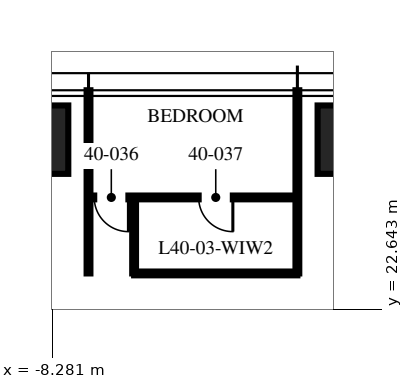
"""IFC4 building model, lengths in metres.
Left out: names, types, materials, properties, quantities, classifications, styles, units other than length and angle.
Written with IfcOpenShell. Run it as: python <this file> out.ifc"""

import sys

from ifc_helpers import new_model, si_unit, direction, frame, frame_2d, origin, origin_2d, place, context, subcontext, project, spatial, rectangle, extrude, element, fill, save


model = new_model("IFC4")
c1 = context("Model", 3, precision=1e-05, world=origin(), true_north=direction((0.0, 1.0)))
c2 = subcontext(c1, "Body", "Model", "MODEL_VIEW")
j1 = project(units=[si_unit("LENGTHUNIT", "METRE"), si_unit("PLANEANGLEUNIT", "RADIAN")], contexts=[c1])
p1 = place(None, origin())
s1 = spatial("IfcSite", under=j1, at=p1, CompositionType="ELEMENT")
p2 = place(p1, origin())
s2 = spatial("IfcBuilding", under=s1, at=p2, CompositionType="ELEMENT")
p3 = place(p2, frame((0.0, 0.0, 159.75)))
s3 = spatial("IfcBuildingStorey", under=s2, at=p3, CompositionType="ELEMENT", Elevation=159.75)
for number, where, z_axis, x_axis in (
    (1, (-9.16, 27.1, 0.0), (0.0, 0.0, 1.0), (1.0, 0.0, 0.0)),
    (2, (0.0, 27.1, 0.0), (0.0, 0.0, 1.0), (1.0, 0.0, 0.0)),
):
    element("IfcColumn", number, at=place(p3, frame(where, z_axis=z_axis, x_axis=x_axis)), inside=s3, PredefinedType="COLUMN", context=c2, shape_type="SweptSolid", body=[
        extrude(rectangle(XDim=2.6, YDim=1.8, at=origin_2d()), origin(), (0.0, 0.0, 1.0), 3.75),
    ])
for number, where, z_axis, x_axis in (
    (3, (-1.832, 23.58, 0.0), (0.0, 0.0, 1.0), (0.0, 1.0, 0.0)),
    (4, (-7.328, 23.58, 0.0), (0.0, 0.0, 1.0), (0.0, 1.0, 0.0)),
):
    element("IfcWall", number, at=place(p3, frame(where, z_axis=z_axis, x_axis=x_axis)), inside=s3, PredefinedType="PARTITIONING", context=c2, shape_type="SweptSolid", body=[
        extrude(rectangle(XDim=4.82, YDim=0.1, at=frame_2d((2.41, 0.0))), origin(), (0.0, 0.0, 1.0), 2.81),
    ])
p4 = place(p3, frame((-1.832, 25.58, 0.0), z_axis=(0.0, 0.0, 1.0), x_axis=(-1.0, 0.0, 0.0)))
e5 = element("IfcWall", 5, at=p4, inside=s3, PredefinedType="PARTITIONING", context=c2, shape_type="SweptSolid", body=[
    extrude(rectangle(XDim=5.496, YDim=0.1, at=frame_2d((2.748, 0.0))), origin(), (0.0, 0.0, 1.0), 2.81),
])
p5 = place(p4, frame((4.446, 0.0, 0.0)))
e6 = element("IfcOpeningElement", 6, at=p5, cuts=e5, PredefinedType="OPENING", context=c2, shape_type="SweptSolid", body=[
    extrude(rectangle(XDim=0.9, YDim=2.1, at=frame_2d((0.45, 1.05))), frame((0.0, 0.06, 0.0), z_axis=(0.0, -1.0, 0.0), x_axis=(1.0, 0.0, 0.0)), (0.0, 0.0, 1.0), 0.12),
])
p6 = place(p4, frame((1.698, 0.0, 0.0)))
e7 = element("IfcOpeningElement", 7, at=p6, cuts=e5, PredefinedType="OPENING", context=c2, shape_type="SweptSolid", body=[
    extrude(rectangle(XDim=0.9, YDim=2.1, at=frame_2d((0.45, 1.05))), frame((0.0, 0.06, 0.0), z_axis=(0.0, -1.0, 0.0), x_axis=(1.0, 0.0, 0.0)), (0.0, 0.0, 1.0), 0.12),
])
p7 = place(p3, frame((-6.128, 23.58, 0.0), z_axis=(0.0, 0.0, 1.0), x_axis=(0.0, 1.0, 0.0)))
e8 = element("IfcWall", 8, at=p7, inside=s3, PredefinedType="PARTITIONING", context=c2, shape_type="SweptSolid", body=[
    extrude(rectangle(XDim=2.0, YDim=0.1, at=frame_2d((1.0, 0.0))), origin(), (0.0, 0.0, 1.0), 3.5),
])
p8 = place(p3, frame((-1.832, 23.58, 0.0), z_axis=(0.0, 0.0, 1.0), x_axis=(-1.0, 0.0, 0.0)))
e9 = element("IfcWall", 9, at=p8, inside=s3, PredefinedType="PARTITIONING", context=c2, shape_type="SweptSolid", body=[
    extrude(rectangle(XDim=4.296, YDim=0.1, at=frame_2d((2.148, 0.0))), origin(), (0.0, 0.0, 1.0), 2.81),
])
p9 = place(p5, origin())
e10 = element("IfcDoor", 10, at=p9, inside=s3, OperationType="SINGLE_SWING_LEFT", PredefinedType="DOOR", context=c2, shape_type="SweptSolid", body=[
    extrude(rectangle(XDim=0.9, YDim=2.1, at=frame_2d((0.45, 1.05))), frame((0.0, 0.025, 0.0), z_axis=(0.0, -1.0, 0.0), x_axis=(1.0, 0.0, 0.0)), (0.0, 0.0, 1.0), 0.05),
])
fill(e6, e10)
p10 = place(p6, origin())
e11 = element("IfcDoor", 11, at=p10, inside=s3, OperationType="SINGLE_SWING_LEFT", PredefinedType="DOOR", context=c2, shape_type="SweptSolid", body=[
    extrude(rectangle(XDim=0.9, YDim=2.1, at=frame_2d((0.45, 1.05))), frame((0.0, 0.025, 0.0), z_axis=(0.0, -1.0, 0.0), x_axis=(1.0, 0.0, 0.0)), (0.0, 0.0, 1.0), 0.05),
])
fill(e7, e11)
save(model, sys.argv[1])
